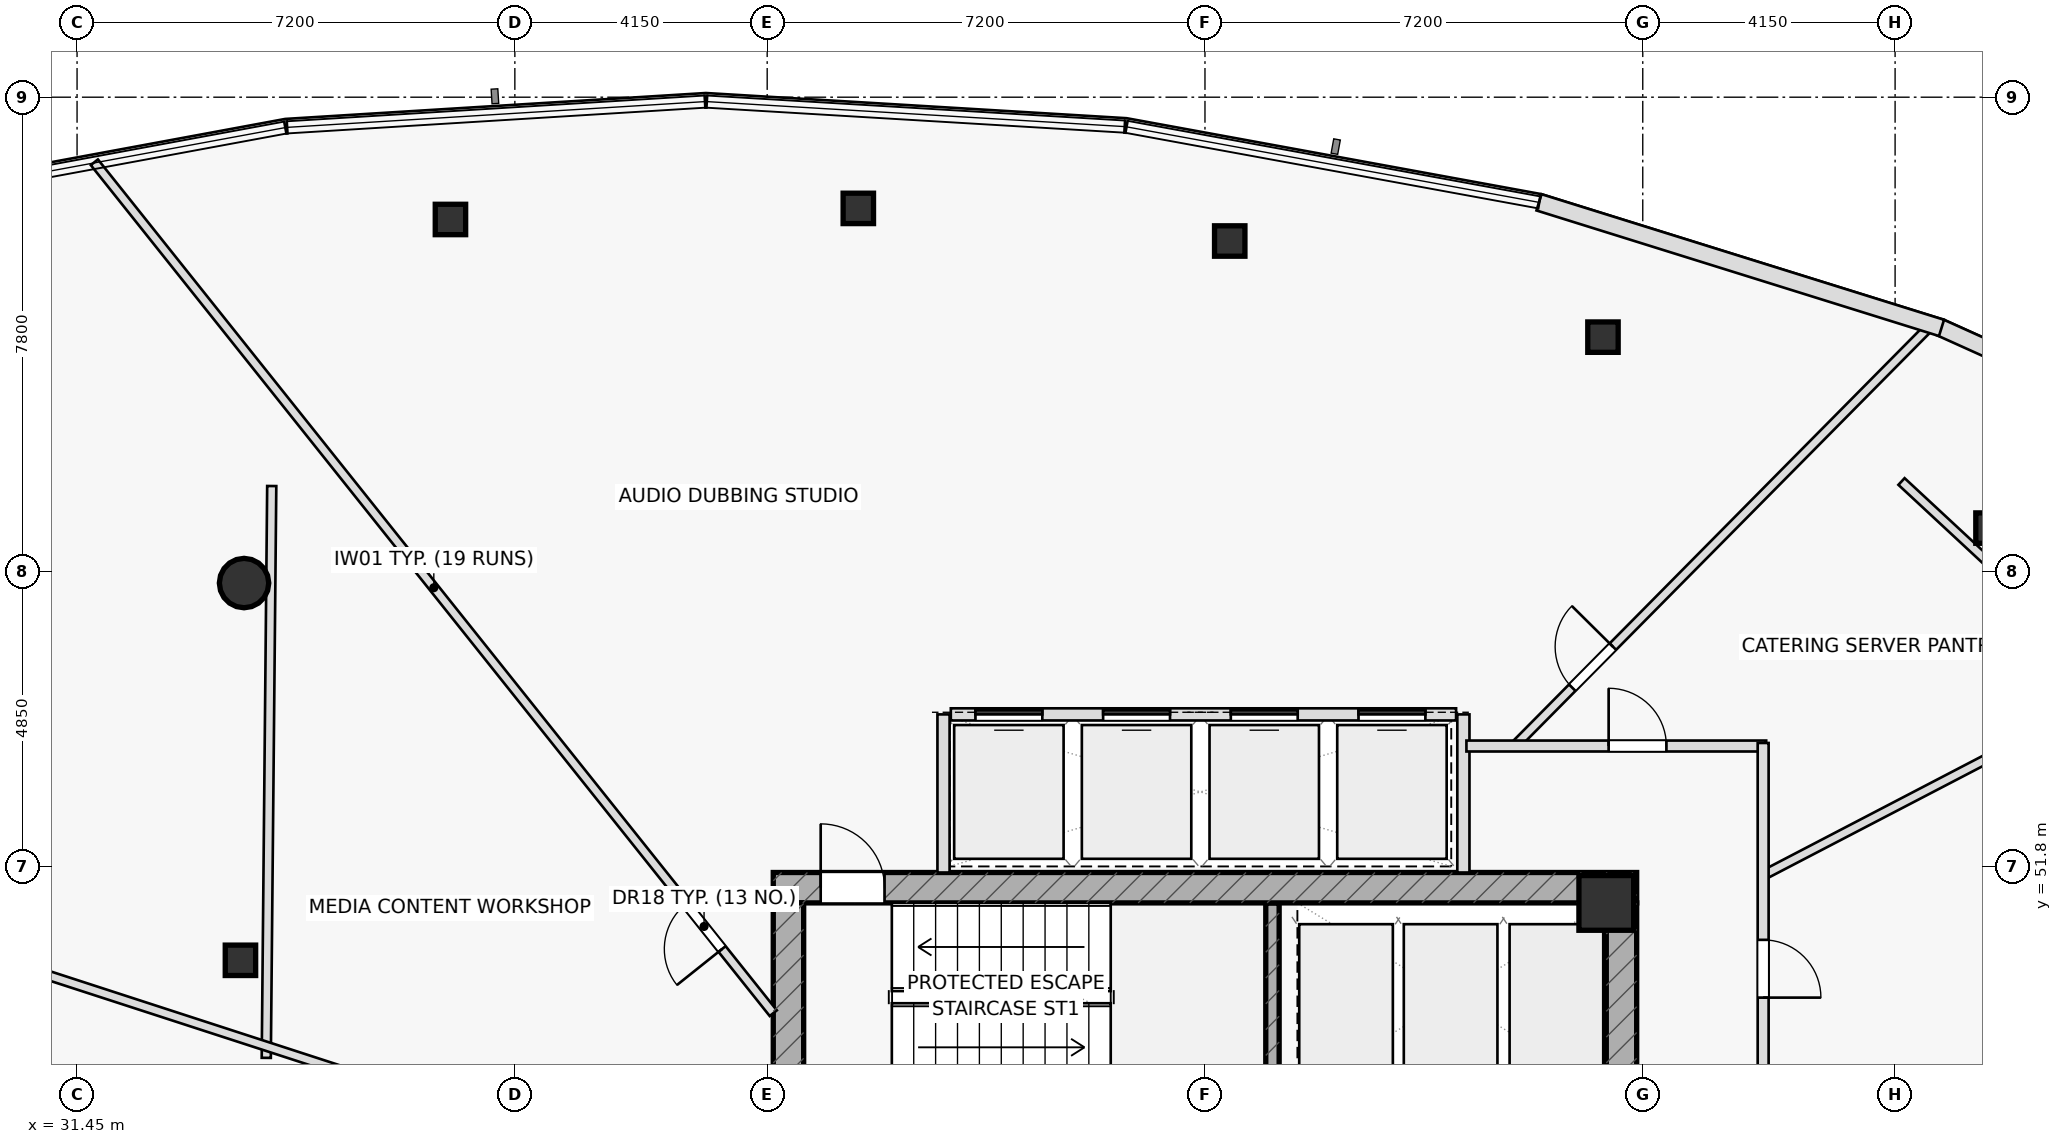
"""IFC4 building model, lengths in metres.
Left out: names, types, materials, properties, quantities, classifications, styles, units other than length and angle.
Written with IfcOpenShell. Run it as: python <this file> out.ifc"""

import sys

from ifc_helpers import new_model, si_unit, direction, frame, frame_2d, origin, origin_2d, place, context, subcontext, project, spatial, rectangle, hollow_rectangle, hollow_circle, extrude, element, fill, save


model = new_model("IFC4")
c1 = context("Model", 3, precision=1e-05, world=origin(), true_north=direction((0.0, 1.0)))
c2 = subcontext(c1, "Body", "Model", "MODEL_VIEW")
j1 = project(units=[si_unit("LENGTHUNIT", "METRE"), si_unit("PLANEANGLEUNIT", "RADIAN")], contexts=[c1])
p1 = place(None, origin())
s1 = spatial("IfcSite", under=j1, at=p1, CompositionType="ELEMENT")
p2 = place(p1, origin())
s2 = spatial("IfcBuilding", under=s1, at=p2, CompositionType="ELEMENT")
p3 = place(p2, frame((0.0, 0.0, 265.6)))
s3 = spatial("IfcBuildingStorey", under=s2, at=p3, CompositionType="ELEMENT", Elevation=265.6)
p4 = place(p3, frame((51.11, 48.1, 0.0), z_axis=(0.0, 0.0, 1.0), x_axis=(0.0, 1.0, 0.0)))
e1 = element("IfcWall", 1, at=p4, inside=s3, PredefinedType="SHEAR", context=c2, shape_type="SweptSolid", body=[
    extrude(rectangle(XDim=3.1, YDim=0.22, at=frame_2d((1.55, 0.0))), origin(), (0.0, 0.0, 1.0), 3.65),
])
p5 = place(p3, frame((42.9, 51.45, 0.0), z_axis=(0.0, 0.0, 1.0), x_axis=(1.0, 0.0, 0.0)))
e2 = element("IfcWall", 2, at=p5, inside=s3, PredefinedType="SHEAR", context=c2, shape_type="SweptSolid", body=[
    extrude(rectangle(XDim=14.2, YDim=0.5, at=frame_2d((7.1, 0.0))), origin(), (0.0, 0.0, 1.0), 3.65),
])
p6 = place(p5, frame((0.78, 0.0, 0.0)))
e3 = element("IfcOpeningElement", 3, at=p6, cuts=e2, PredefinedType="OPENING", context=c2, shape_type="SweptSolid", body=[
    extrude(rectangle(XDim=1.05, YDim=2.2, at=frame_2d((0.525, 1.1))), frame((0.0, 0.26, 0.0), z_axis=(0.0, -1.0, 0.0), x_axis=(1.0, 0.0, 0.0)), (0.0, 0.0, 1.0), 0.52),
])
p7 = place(p3, frame((43.15, 38.8, 0.0), z_axis=(0.0, 0.0, 1.0), x_axis=(0.0, 1.0, 0.0)))
e4 = element("IfcWall", 4, at=p7, inside=s3, PredefinedType="SHEAR", context=c2, shape_type="SweptSolid", body=[
    extrude(rectangle(XDim=12.4, YDim=0.5, at=frame_2d((6.2, 0.0))), origin(), (0.0, 0.0, 1.0), 3.65),
])
p8 = place(p3, frame((56.85, 38.8, 0.0), z_axis=(0.0, 0.0, 1.0), x_axis=(0.0, 1.0, 0.0)))
e5 = element("IfcWall", 5, at=p8, inside=s3, PredefinedType="SHEAR", context=c2, shape_type="SweptSolid", body=[
    extrude(rectangle(XDim=12.4, YDim=0.5, at=frame_2d((6.2, 0.0))), origin(), (0.0, 0.0, 1.0), 3.65),
])
p9 = place(p8, frame((3.85, 0.0, 0.0)))
e6 = element("IfcOpeningElement", 6, at=p9, cuts=e5, PredefinedType="OPENING", context=c2, shape_type="SweptSolid", body=[
    extrude(rectangle(XDim=1.5, YDim=2.2, at=frame_2d((0.75, 1.1))), frame((0.0, 0.26, 0.0), z_axis=(0.0, -1.0, 0.0), x_axis=(1.0, 0.0, 0.0)), (0.0, 0.0, 1.0), 0.52),
])
p10 = place(p3, frame((56.6, 51.2, 0.0), z_axis=(0.0, 0.0, 1.0), x_axis=(1.0, 0.0, 0.0)))
e7 = element("IfcColumn", 7, at=p10, inside=s3, PredefinedType="COLUMN", context=c2, shape_type="SweptSolid", body=[
    extrude(rectangle(XDim=0.9, YDim=0.9, at=origin_2d()), origin(), (0.0, 0.0, 1.0), 3.65),
])
p11 = place(p3, frame((34.196, 56.46, 0.0), z_axis=(0.0, 0.0, 1.0), x_axis=(1.0, 0.0, 0.0)))
e8 = element("IfcColumn", 8, at=p11, inside=s3, PredefinedType="COLUMN", context=c2, shape_type="SweptSolid", body=[
    extrude(hollow_circle(Radius=0.406, WallThickness=0.036, at=origin_2d()), origin(), (0.0, 0.0, 1.0), 3.65),
])
for number, where, z_axis, x_axis in (
    (9, (34.137, 50.256, 0.0), (0.0, 0.0, 1.0), (1.0, 0.0, 0.0)),
    (10, (62.927, 57.364, 0.0), (0.0, 0.0, 1.0), (1.0, 0.0, 0.0)),
    (11, (56.546, 60.504, 0.0), (0.0, 0.0, 1.0), (1.0, 0.0, 0.0)),
    (12, (50.407, 62.085, 0.0), (0.0, 0.0, 1.0), (1.0, 0.0, 0.0)),
    (13, (44.299, 62.621, 0.0), (0.0, 0.0, 1.0), (1.0, 0.0, 0.0)),
    (14, (37.591, 62.439, 0.0), (0.0, 0.0, 1.0), (1.0, 0.0, 0.0)),
):
    element("IfcColumn", number, at=place(p3, frame(where, z_axis=z_axis, x_axis=x_axis)), inside=s3, PredefinedType="COLUMN", context=c2, shape_type="SweptSolid", body=[
        extrude(hollow_rectangle(XDim=0.5, YDim=0.5, WallThickness=0.03, at=origin_2d()), origin(), (0.0, 0.0, 1.0), 3.65),
    ])
for number, where, z_axis, x_axis in (
    (15, (45.7, 51.7, 0.0), (0.0, 0.0, 1.0), (0.0, 1.0, 0.0)),
    (16, (54.25, 51.7, 0.0), (0.0, 0.0, 1.0), (0.0, 1.0, 0.0)),
):
    element("IfcWall", number, at=place(p3, frame(where, z_axis=z_axis, x_axis=x_axis)), inside=s3, PredefinedType="PARTITIONING", context=c2, shape_type="SweptSolid", body=[
        extrude(rectangle(XDim=2.6, YDim=0.2, at=frame_2d((1.3, 0.0))), origin(), (0.0, 0.0, 1.0), 3.65),
    ])
p12 = place(p3, frame((34.652, 58.056, 0.0), z_axis=(0.0, 0.0, 1.0), x_axis=(-0.009553538759, -0.999954363907, 0.0)))
e17 = element("IfcWall", 17, at=p12, inside=s3, PredefinedType="PARTITIONING", context=c2, shape_type="SweptSolid", body=[
    extrude(rectangle(XDim=9.404, YDim=0.15, at=frame_2d((4.702, 0.0))), origin(), (0.0, 0.0, 1.0), 3.175),
])
p13 = place(p3, frame((69.792, 50.388, 0.0), z_axis=(0.0, 0.0, 1.0), x_axis=(-0.732769799181, 0.680476613418, 0.0)))
e18 = element("IfcWall", 18, at=p13, inside=s3, PredefinedType="PARTITIONING", context=c2, shape_type="SweptSolid", body=[
    extrude(rectangle(XDim=11.378, YDim=0.15, at=frame_2d((5.689, 0.0))), origin(), (0.0, 0.0, 1.0), 3.075),
])
p14 = place(p3, frame((42.9, 49.386, 0.0), z_axis=(0.0, 0.0, 1.0), x_axis=(-0.623691664513, 0.781670459731, 0.0)))
e19 = element("IfcWall", 19, at=p14, inside=s3, PredefinedType="PARTITIONING", context=c2, shape_type="SweptSolid", body=[
    extrude(rectangle(XDim=17.902, YDim=0.15, at=frame_2d((8.951, 0.0))), origin(), (0.0, 0.0, 1.0), 3.075),
])
p15 = place(p14, frame((1.35, 0.0, 0.0)))
e20 = element("IfcOpeningElement", 20, at=p15, cuts=e19, PredefinedType="OPENING", context=c2, shape_type="SweptSolid", body=[
    extrude(rectangle(XDim=0.95, YDim=2.05, at=frame_2d((0.475, 1.025))), frame((0.0, 0.085, 0.0), z_axis=(0.0, -1.0, 0.0), x_axis=(1.0, 0.0, 0.0)), (0.0, 0.0, 1.0), 0.17),
])
p16 = place(p3, frame((37.344, 47.94, 0.0), z_axis=(0.0, 0.0, 1.0), x_axis=(-0.951128986238, 0.30879386577, 0.0)))
e21 = element("IfcWall", 21, at=p16, inside=s3, PredefinedType="PARTITIONING", context=c2, shape_type="SweptSolid", body=[
    extrude(rectangle(XDim=13.131, YDim=0.15, at=frame_2d((6.565, 0.0))), origin(), (0.0, 0.0, 1.0), 3.175),
])
p17 = place(p3, frame((59.18, 51.654, 0.0), z_axis=(0.0, 0.0, 1.0), x_axis=(0.886983860718, 0.461800423155, 0.0)))
e22 = element("IfcWall", 22, at=p17, inside=s3, PredefinedType="PARTITIONING", context=c2, shape_type="SweptSolid", body=[
    extrude(rectangle(XDim=11.795, YDim=0.15, at=frame_2d((5.897, 0.0))), origin(), (0.0, 0.0, 1.0), 3.175),
])
p18 = place(p3, frame((55.091, 53.78, 0.0), z_axis=(0.0, 0.0, 1.0), x_axis=(0.703482432315, 0.710712647576, 0.0)))
e23 = element("IfcWall", 23, at=p18, inside=s3, PredefinedType="PARTITIONING", context=c2, shape_type="SweptSolid", body=[
    extrude(rectangle(XDim=9.759, YDim=0.15, at=frame_2d((4.879, 0.0))), origin(), (0.0, 0.0, 1.0), 3.075),
])
p19 = place(p18, frame((1.35, 0.0, 0.0)))
e24 = element("IfcOpeningElement", 24, at=p19, cuts=e23, PredefinedType="OPENING", context=c2, shape_type="SweptSolid", body=[
    extrude(rectangle(XDim=0.95, YDim=2.05, at=frame_2d((0.475, 1.025))), frame((0.0, 0.085, 0.0), z_axis=(0.0, -1.0, 0.0), x_axis=(1.0, 0.0, 0.0)), (0.0, 0.0, 1.0), 0.17),
])
p20 = place(p3, frame((54.3, 53.78, 0.0), z_axis=(0.0, 0.0, 1.0), x_axis=(1.0, 0.0, 0.0)))
e25 = element("IfcWall", 25, at=p20, inside=s3, PredefinedType="PARTITIONING", context=c2, shape_type="SweptSolid", body=[
    extrude(rectangle(XDim=4.93, YDim=0.18, at=frame_2d((2.465, 0.0))), origin(), (0.0, 0.0, 1.0), 3.65),
])
p21 = place(p20, frame((2.339, 0.0, 0.0)))
e26 = element("IfcOpeningElement", 26, at=p21, cuts=e25, PredefinedType="OPENING", context=c2, shape_type="SweptSolid", body=[
    extrude(rectangle(XDim=0.95, YDim=2.05, at=frame_2d((0.475, 1.025))), frame((0.0, 0.1, 0.0), z_axis=(0.0, -1.0, 0.0), x_axis=(1.0, 0.0, 0.0)), (0.0, 0.0, 1.0), 0.2),
])
p22 = place(p3, frame((59.18, 53.83, 0.0), z_axis=(0.0, 0.0, 1.0), x_axis=(0.0, -1.0, 0.0)))
e27 = element("IfcWall", 27, at=p22, inside=s3, PredefinedType="PARTITIONING", context=c2, shape_type="SweptSolid", body=[
    extrude(rectangle(XDim=5.53, YDim=0.18, at=frame_2d((2.765, 0.0))), origin(), (0.0, 0.0, 1.0), 3.65),
])
p23 = place(p22, frame((3.238, 0.0, 0.0)))
e28 = element("IfcOpeningElement", 28, at=p23, cuts=e27, PredefinedType="OPENING", context=c2, shape_type="SweptSolid", body=[
    extrude(rectangle(XDim=0.95, YDim=2.05, at=frame_2d((0.475, 1.025))), frame((0.0, 0.1, 0.0), z_axis=(0.0, -1.0, 0.0), x_axis=(1.0, 0.0, 0.0)), (0.0, 0.0, 1.0), 0.2),
])
p24 = place(p3, frame((68.417, 57.811, 0.0), z_axis=(0.0, 0.0, 1.0), x_axis=(-0.911568677277, 0.411147840329, 0.0)))
e29 = element("IfcWall", 29, at=p24, inside=s3, PredefinedType="STANDARD", context=c2, shape_type="SweptSolid", body=[
    extrude(rectangle(XDim=6.946, YDim=0.28, at=frame_2d((3.473, 0.0))), origin(), (0.0, 0.0, 1.0), 3.65),
])
p25 = place(p3, frame((62.113, 60.656, 0.0), z_axis=(0.0, 0.0, 1.0), x_axis=(-0.954621453054, 0.297821895382, 0.0)))
e30 = element("IfcWall", 30, at=p25, inside=s3, PredefinedType="STANDARD", context=c2, shape_type="SweptSolid", body=[
    extrude(rectangle(XDim=6.934, YDim=0.28, at=frame_2d((3.467, 0.0))), origin(), (0.0, 0.0, 1.0), 3.65),
])
p26 = place(p3, frame((45.82, 54.3, 0.0), z_axis=(0.0, 0.0, 1.0), x_axis=(1.0, 0.0, 0.0)))
e31 = element("IfcWall", 31, at=p26, inside=s3, PredefinedType="PARTITIONING", context=c2, shape_type="SweptSolid", body=[
    extrude(rectangle(XDim=8.31, YDim=0.2, at=frame_2d((4.155, 0.0))), origin(), (0.0, 0.0, 1.0), 3.65),
])
p27 = place(p26, frame((0.405, 0.0, 0.0)))
e32 = element("IfcOpeningElement", 32, at=p27, cuts=e31, PredefinedType="OPENING", context=c2, shape_type="SweptSolid", body=[
    extrude(rectangle(XDim=1.1, YDim=2.15, at=frame_2d((0.55, 1.075))), frame((0.0, 0.11, 0.0), z_axis=(0.0, -1.0, 0.0), x_axis=(1.0, 0.0, 0.0)), (0.0, 0.0, 1.0), 0.22),
])
p28 = place(p26, frame((2.505, 0.0, 0.0)))
e33 = element("IfcOpeningElement", 33, at=p28, cuts=e31, PredefinedType="OPENING", context=c2, shape_type="SweptSolid", body=[
    extrude(rectangle(XDim=1.1, YDim=2.15, at=frame_2d((0.55, 1.075))), frame((0.0, 0.11, 0.0), z_axis=(0.0, -1.0, 0.0), x_axis=(1.0, 0.0, 0.0)), (0.0, 0.0, 1.0), 0.22),
])
p29 = place(p26, frame((4.605, 0.0, 0.0)))
e34 = element("IfcOpeningElement", 34, at=p29, cuts=e31, PredefinedType="OPENING", context=c2, shape_type="SweptSolid", body=[
    extrude(rectangle(XDim=1.1, YDim=2.15, at=frame_2d((0.55, 1.075))), frame((0.0, 0.11, 0.0), z_axis=(0.0, -1.0, 0.0), x_axis=(1.0, 0.0, 0.0)), (0.0, 0.0, 1.0), 0.22),
])
p30 = place(p26, frame((6.705, 0.0, 0.0)))
e35 = element("IfcOpeningElement", 35, at=p30, cuts=e31, PredefinedType="OPENING", context=c2, shape_type="SweptSolid", body=[
    extrude(rectangle(XDim=1.1, YDim=2.15, at=frame_2d((0.55, 1.075))), frame((0.0, 0.11, 0.0), z_axis=(0.0, -1.0, 0.0), x_axis=(1.0, 0.0, 0.0)), (0.0, 0.0, 1.0), 0.22),
])
p31 = place(p6, origin())
e36 = element("IfcDoor", 36, at=p31, inside=s3, OperationType="SINGLE_SWING_LEFT", PredefinedType="DOOR", context=c2, shape_type="SweptSolid", body=[
    extrude(rectangle(XDim=1.05, YDim=2.2, at=frame_2d((0.525, 1.1))), frame((0.0, 0.025, 0.0), z_axis=(0.0, -1.0, 0.0), x_axis=(1.0, 0.0, 0.0)), (0.0, 0.0, 1.0), 0.05),
])
fill(e3, e36)
p32 = place(p15, origin())
e37 = element("IfcDoor", 37, at=p32, inside=s3, OperationType="SINGLE_SWING_LEFT", PredefinedType="DOOR", context=c2, shape_type="SweptSolid", body=[
    extrude(rectangle(XDim=0.95, YDim=2.05, at=frame_2d((0.475, 1.025))), frame((0.0, 0.025, 0.0), z_axis=(0.0, -1.0, 0.0), x_axis=(1.0, 0.0, 0.0)), (0.0, 0.0, 1.0), 0.05),
])
fill(e20, e37)
p33 = place(p19, origin())
e38 = element("IfcDoor", 38, at=p33, inside=s3, OperationType="SINGLE_SWING_RIGHT", PredefinedType="DOOR", context=c2, shape_type="SweptSolid", body=[
    extrude(rectangle(XDim=0.95, YDim=2.05, at=frame_2d((0.475, 1.025))), frame((0.0, 0.025, 0.0), z_axis=(0.0, -1.0, 0.0), x_axis=(1.0, 0.0, 0.0)), (0.0, 0.0, 1.0), 0.05),
])
fill(e24, e38)
p34 = place(p21, origin())
e39 = element("IfcDoor", 39, at=p34, inside=s3, OperationType="SINGLE_SWING_LEFT", PredefinedType="DOOR", context=c2, shape_type="SweptSolid", body=[
    extrude(rectangle(XDim=0.95, YDim=2.05, at=frame_2d((0.475, 1.025))), frame((0.0, 0.025, 0.0), z_axis=(0.0, -1.0, 0.0), x_axis=(1.0, 0.0, 0.0)), (0.0, 0.0, 1.0), 0.05),
])
fill(e26, e39)
p35 = place(p23, origin())
e40 = element("IfcDoor", 40, at=p35, inside=s3, OperationType="SINGLE_SWING_RIGHT", PredefinedType="DOOR", context=c2, shape_type="SweptSolid", body=[
    extrude(rectangle(XDim=0.95, YDim=2.05, at=frame_2d((0.475, 1.025))), frame((0.0, 0.025, 0.0), z_axis=(0.0, -1.0, 0.0), x_axis=(1.0, 0.0, 0.0)), (0.0, 0.0, 1.0), 0.05),
])
fill(e28, e40)
p36 = place(p27, origin())
e41 = element("IfcDoor", 41, at=p36, inside=s3, OperationType="SLIDING_TO_LEFT", PredefinedType="DOOR", context=c2, shape_type="SweptSolid", body=[
    extrude(rectangle(XDim=1.1, YDim=2.15, at=frame_2d((0.55, 1.075))), frame((0.0, 0.025, 0.0), z_axis=(0.0, -1.0, 0.0), x_axis=(1.0, 0.0, 0.0)), (0.0, 0.0, 1.0), 0.05),
])
fill(e32, e41)
p37 = place(p28, origin())
e42 = element("IfcDoor", 42, at=p37, inside=s3, OperationType="SLIDING_TO_RIGHT", PredefinedType="DOOR", context=c2, shape_type="SweptSolid", body=[
    extrude(rectangle(XDim=1.1, YDim=2.15, at=frame_2d((0.55, 1.075))), frame((0.0, 0.025, 0.0), z_axis=(0.0, -1.0, 0.0), x_axis=(1.0, 0.0, 0.0)), (0.0, 0.0, 1.0), 0.05),
])
fill(e33, e42)
p38 = place(p29, origin())
e43 = element("IfcDoor", 43, at=p38, inside=s3, OperationType="SLIDING_TO_LEFT", PredefinedType="DOOR", context=c2, shape_type="SweptSolid", body=[
    extrude(rectangle(XDim=1.1, YDim=2.15, at=frame_2d((0.55, 1.075))), frame((0.0, 0.025, 0.0), z_axis=(0.0, -1.0, 0.0), x_axis=(1.0, 0.0, 0.0)), (0.0, 0.0, 1.0), 0.05),
])
fill(e34, e43)
p39 = place(p30, origin())
e44 = element("IfcDoor", 44, at=p39, inside=s3, OperationType="SLIDING_TO_RIGHT", PredefinedType="DOOR", context=c2, shape_type="SweptSolid", body=[
    extrude(rectangle(XDim=1.1, YDim=2.15, at=frame_2d((0.55, 1.075))), frame((0.0, 0.025, 0.0), z_axis=(0.0, -1.0, 0.0), x_axis=(1.0, 0.0, 0.0)), (0.0, 0.0, 1.0), 0.05),
])
fill(e35, e44)
save(model, sys.argv[1])
